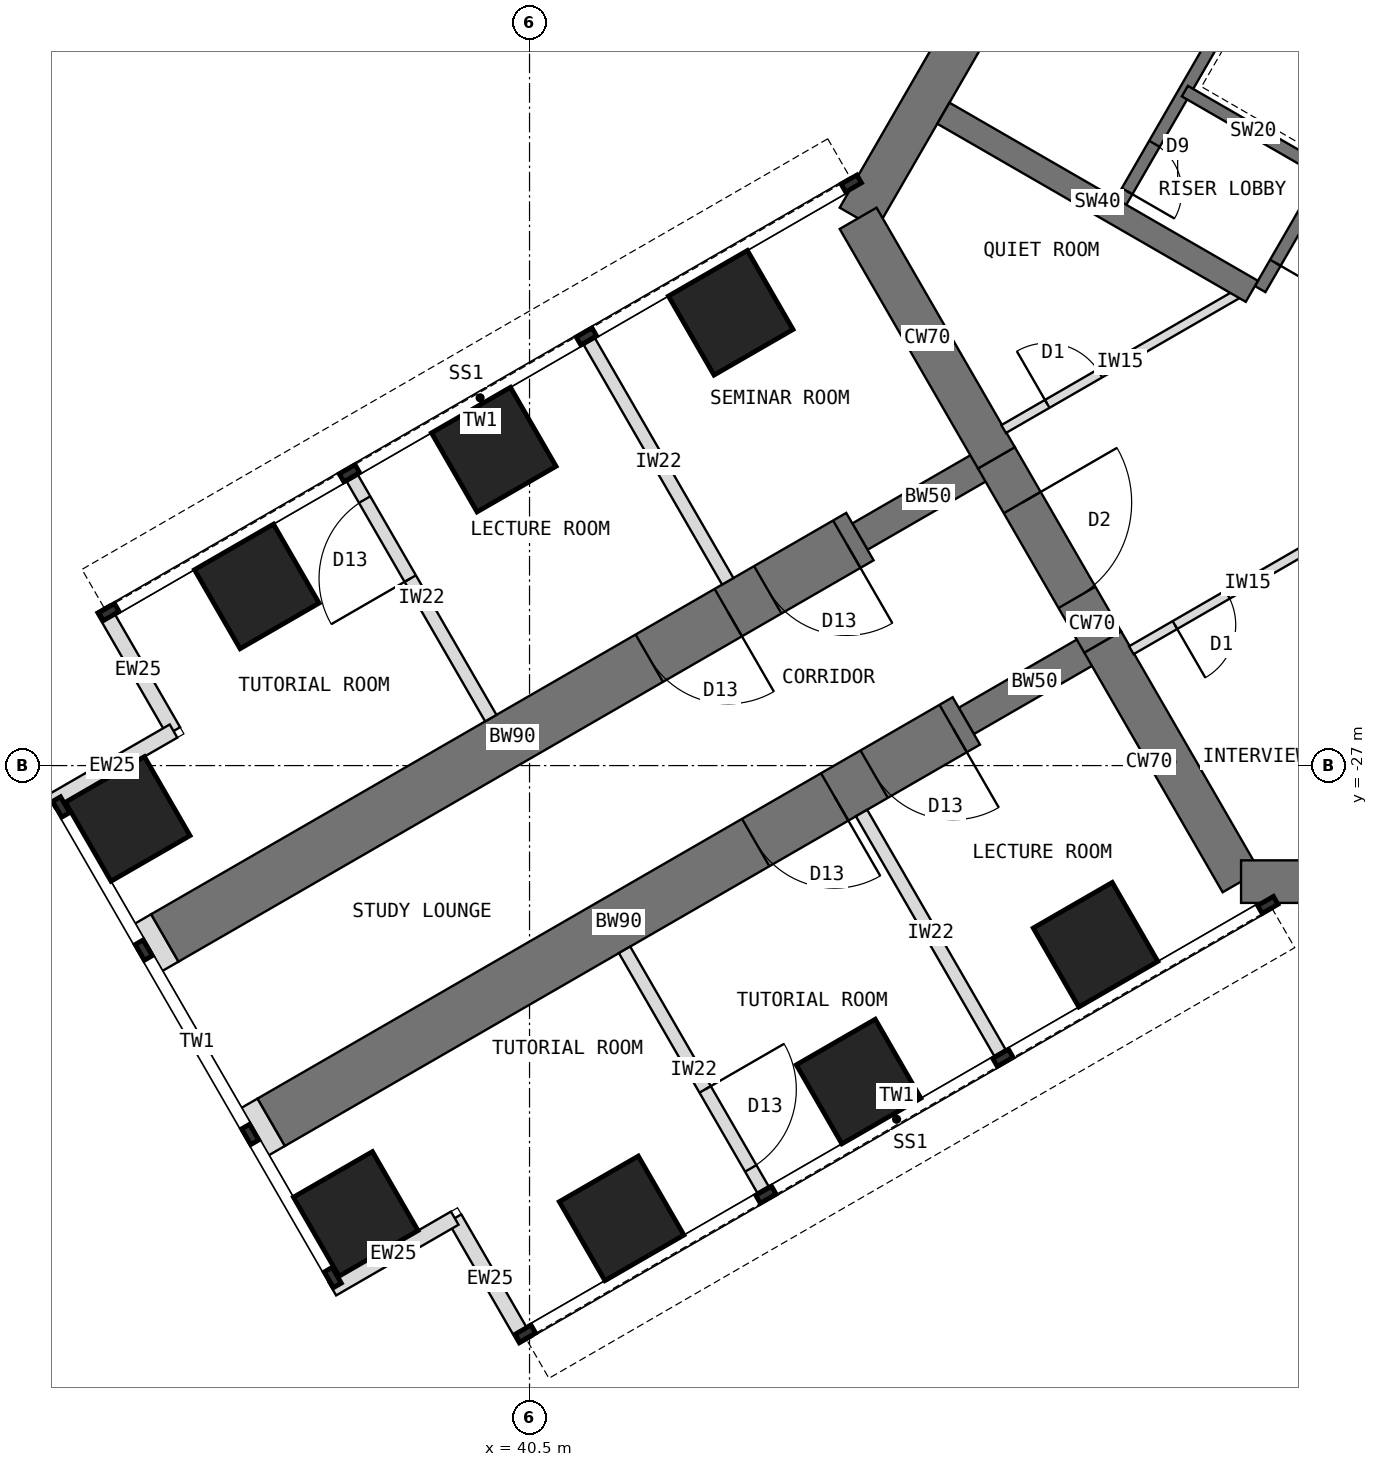
"""IFC4 building model, lengths in metres.
Left out: names, types, materials, properties, quantities, classifications, styles, units other than length and angle.
Written with IfcOpenShell. Run it as: python <this file> out.ifc"""

import sys

from ifc_helpers import new_model, si_unit, direction, frame, frame_2d, origin, origin_2d, place, context, subcontext, project, spatial, rectangle, extrude, element, fill, save


model = new_model("IFC4")
c1 = context("Model", 3, precision=1e-05, world=origin(), true_north=direction((0.0, 1.0)))
c2 = subcontext(c1, "Body", "Model", "MODEL_VIEW")
j1 = project(units=[si_unit("LENGTHUNIT", "METRE"), si_unit("PLANEANGLEUNIT", "RADIAN")], contexts=[c1])
p1 = place(None, origin())
s1 = spatial("IfcSite", under=j1, at=p1, CompositionType="ELEMENT")
p2 = place(p1, origin())
s2 = spatial("IfcBuilding", under=s1, at=p2, CompositionType="ELEMENT")
p3 = place(p2, frame((0.0, 0.0, 36.5)))
s3 = spatial("IfcBuildingStorey", under=s2, at=p3, CompositionType="ELEMENT", Elevation=36.5)
p4 = place(p3, frame((52.202, -7.092, 0.0), z_axis=(0.0, 0.0, 1.0), x_axis=(-0.500005998175, -0.866021940709, 0.0)))
e1 = element("IfcWall", 1, at=p4, inside=s3, PredefinedType="SHEAR", context=c2, shape_type="SweptSolid", body=[
    extrude(rectangle(XDim=12.596, YDim=0.7, at=frame_2d((6.298, 0.0))), origin(), (0.0, 0.0, 1.0), 4.0),
])
p5 = place(p3, frame((45.904, -18.0, 0.0), z_axis=(0.0, 0.0, 1.0), x_axis=(0.500024481964, -0.866011268655, 0.0)))
e2 = element("IfcWall", 2, at=p5, inside=s3, PredefinedType="SHEAR", context=c2, shape_type="SweptSolid", body=[
    extrude(rectangle(XDim=4.548, YDim=0.7, at=frame_2d((2.274, 0.0))), origin(), (0.0, 0.0, 1.0), 4.0),
])
p6 = place(p3, frame((48.178, -21.939, 0.0), z_axis=(0.0, 0.0, 1.0), x_axis=(0.500010275428, -0.866019471182, 0.0)))
e3 = element("IfcWall", 3, at=p6, inside=s3, PredefinedType="SHEAR", context=c2, shape_type="SweptSolid", body=[
    extrude(rectangle(XDim=3.5, YDim=0.7, at=frame_2d((1.75, 0.0))), origin(), (0.0, 0.0, 1.0), 4.0),
])
p7 = place(p6, frame((0.85, 0.0, 0.0)))
e4 = element("IfcOpeningElement", 4, at=p7, cuts=e3, PredefinedType="OPENING", context=c2, shape_type="SweptSolid", body=[
    extrude(rectangle(XDim=1.8, YDim=2.1, at=frame_2d((0.9, 1.05))), frame((0.0, 0.36, 0.0), z_axis=(0.0, -1.0, 0.0), x_axis=(1.0, 0.0, 0.0)), (0.0, 0.0, 1.0), 0.72),
])
p8 = place(p3, frame((49.928, -24.97, 0.0), z_axis=(0.0, 0.0, 1.0), x_axis=(0.499984222037, -0.866034513004, 0.0)))
e5 = element("IfcWall", 5, at=p8, inside=s3, PredefinedType="SHEAR", context=c2, shape_type="SweptSolid", body=[
    extrude(rectangle(XDim=4.548, YDim=0.7, at=frame_2d((2.274, 0.0))), origin(), (0.0, 0.0, 1.0), 4.0),
])
p9 = place(p3, frame((52.202, -28.908, 0.0), z_axis=(0.0, 0.0, 1.0), x_axis=(1.0, 0.0, 0.0)))
e6 = element("IfcWall", 6, at=p9, inside=s3, PredefinedType="SHEAR", context=c2, shape_type="SweptSolid", body=[
    extrude(rectangle(XDim=12.596, YDim=0.7, at=frame_2d((6.298, 0.0))), origin(), (0.0, 0.0, 1.0), 4.0),
])
p10 = place(p3, frame((49.928, -24.97, 0.0), z_axis=(0.0, 0.0, 1.0), x_axis=(-0.866031863473, -0.499988811324, 0.0)))
e7 = element("IfcWall", 7, at=p10, inside=s3, PredefinedType="SHEAR", context=c2, shape_type="SweptSolid", body=[
    extrude(rectangle(XDim=2.592, YDim=0.5, at=frame_2d((1.296, 0.0))), origin(), (0.0, 0.0, 1.0), 4.0),
])
p11 = place(p3, frame((47.684, -26.266, 0.0), z_axis=(0.0, 0.0, 1.0), x_axis=(-0.866027579429, -0.499996231654, 0.0)))
e8 = element("IfcWall", 8, at=p11, inside=s3, PredefinedType="SHEAR", context=c2, shape_type="SweptSolid", body=[
    extrude(rectangle(XDim=13.2, YDim=0.9, at=frame_2d((6.6, 0.0))), origin(), (0.0, 0.0, 1.0), 4.0),
])
p12 = place(p11, frame((0.25, 0.0, 0.0)))
e9 = element("IfcOpeningElement", 9, at=p12, cuts=e8, PredefinedType="OPENING", context=c2, shape_type="SweptSolid", body=[
    extrude(rectangle(XDim=1.5, YDim=2.1, at=frame_2d((0.75, 1.05))), frame((0.0, 0.46, 0.0), z_axis=(0.0, -1.0, 0.0), x_axis=(1.0, 0.0, 0.0)), (0.0, 0.0, 1.0), 0.92),
])
p13 = place(p11, frame((2.5, 0.0, 0.0)))
e10 = element("IfcOpeningElement", 10, at=p13, cuts=e8, PredefinedType="OPENING", context=c2, shape_type="SweptSolid", body=[
    extrude(rectangle(XDim=1.5, YDim=2.1, at=frame_2d((0.75, 1.05))), frame((0.0, 0.46, 0.0), z_axis=(0.0, -1.0, 0.0), x_axis=(1.0, 0.0, 0.0)), (0.0, 0.0, 1.0), 0.92),
])
p14 = place(p3, frame((48.178, -21.939, 0.0), z_axis=(0.0, 0.0, 1.0), x_axis=(-0.866072649678, -0.499918158782, 0.0)))
e11 = element("IfcWall", 11, at=p14, inside=s3, PredefinedType="SHEAR", context=c2, shape_type="SweptSolid", body=[
    extrude(rectangle(XDim=2.592, YDim=0.5, at=frame_2d((1.296, 0.0))), origin(), (0.0, 0.0, 1.0), 4.0),
])
p15 = place(p3, frame((45.934, -23.234, 0.0), z_axis=(0.0, 0.0, 1.0), x_axis=(-0.866019570528, -0.500010103361, 0.0)))
e12 = element("IfcWall", 12, at=p15, inside=s3, PredefinedType="SHEAR", context=c2, shape_type="SweptSolid", body=[
    extrude(rectangle(XDim=13.2, YDim=0.9, at=frame_2d((6.6, 0.0))), origin(), (0.0, 0.0, 1.0), 4.0),
])
p16 = place(p15, frame((0.25, 0.0, 0.0)))
e13 = element("IfcOpeningElement", 13, at=p16, cuts=e12, PredefinedType="OPENING", context=c2, shape_type="SweptSolid", body=[
    extrude(rectangle(XDim=1.5, YDim=2.1, at=frame_2d((0.75, 1.05))), frame((0.0, 0.46, 0.0), z_axis=(0.0, -1.0, 0.0), x_axis=(1.0, 0.0, 0.0)), (0.0, 0.0, 1.0), 0.92),
])
p17 = place(p15, frame((2.5, 0.0, 0.0)))
e14 = element("IfcOpeningElement", 14, at=p17, cuts=e12, PredefinedType="OPENING", context=c2, shape_type="SweptSolid", body=[
    extrude(rectangle(XDim=1.5, YDim=2.1, at=frame_2d((0.75, 1.05))), frame((0.0, 0.46, 0.0), z_axis=(0.0, -1.0, 0.0), x_axis=(1.0, 0.0, 0.0)), (0.0, 0.0, 1.0), 0.92),
])
for number, where, z_axis, x_axis in (
    (15, (49.809, -29.946, 0.0), (0.0, 0.0, 1.0), (0.866, 0.5, 0.0)),
    (16, (43.809, -19.554, 0.0), (0.0, 0.0, 1.0), (0.866, 0.5, 0.0)),
    (17, (45.912, -32.196, 0.0), (0.0, 0.0, 1.0), (0.866, 0.5, 0.0)),
    (18, (39.912, -21.804, 0.0), (0.0, 0.0, 1.0), (0.866, 0.5, 0.0)),
    (19, (42.014, -34.446, 0.0), (0.0, 0.0, 1.0), (0.866, 0.5, 0.0)),
    (20, (36.014, -24.054, 0.0), (0.0, 0.0, 1.0), (0.866, 0.5, 0.0)),
    (21, (37.642, -34.373, 0.0), (0.0, 0.0, 1.0), (0.866, 0.5, 0.0)),
    (22, (33.892, -27.877, 0.0), (0.0, 0.0, 1.0), (0.866, 0.5, 0.0)),
):
    element("IfcColumn", number, at=place(p3, frame(where, z_axis=z_axis, x_axis=x_axis)), inside=s3, PredefinedType="COLUMN", context=c2, shape_type="SweptSolid", body=[
        extrude(rectangle(XDim=1.5, YDim=1.5, at=origin_2d()), origin(), (0.0, 0.0, 1.0), 4.0),
    ])
for number, where, z_axis, x_axis in (
    (23, (40.433, -36.456, 0.0), (0.0, 0.0, 1.0), (-0.5, 0.866, 0.0)),
    (24, (39.27, -34.443, 0.0), (0.0, 0.0, 1.0), (-0.866, -0.5, 0.0)),
    (25, (33.483, -24.419, 0.0), (0.0, 0.0, 1.0), (0.5, -0.866, 0.0)),
    (26, (34.645, -26.432, 0.0), (0.0, 0.0, 1.0), (-0.866, -0.5, 0.0)),
):
    element("IfcWall", number, at=place(p3, frame(where, z_axis=z_axis, x_axis=x_axis)), inside=s3, PredefinedType="STANDARD", context=c2, shape_type="SweptSolid", body=[
        extrude(rectangle(XDim=2.325, YDim=0.25, at=frame_2d((1.163, 0.0))), origin(), (0.0, 0.0, 1.0), 3.8),
    ])
for number, where, z_axis, x_axis in (
    (27, (36.252, -32.865, 0.0), (0.0, 0.0, 1.0), (-0.866, -0.5, 0.0)),
    (28, (34.502, -29.834, 0.0), (0.0, 0.0, 1.0), (-0.866, -0.5, 0.0)),
):
    element("IfcWall", number, at=place(p3, frame(where, z_axis=z_axis, x_axis=x_axis)), inside=s3, PredefinedType="PARTITIONING", context=c2, shape_type="SweptSolid", body=[
        extrude(rectangle(XDim=0.31, YDim=0.9, at=frame_2d((0.155, 0.0))), origin(), (0.0, 0.0, 1.0), 3.8),
    ])
p18 = place(p3, frame((56.516, -12.236, 0.0), z_axis=(0.0, 0.0, 1.0), x_axis=(-0.49999894854, -0.866026010844, 0.0)))
e29 = element("IfcWall", 29, at=p18, inside=s3, PredefinedType="SHEAR", context=c2, shape_type="SweptSolid", body=[
    extrude(rectangle(XDim=8.0, YDim=0.2, at=frame_2d((4.0, 0.0))), origin(), (0.0, 0.0, 1.0), 4.0),
])
p19 = place(p18, frame((6.3, 0.0, 0.0)))
e30 = element("IfcOpeningElement", 30, at=p19, cuts=e29, PredefinedType="OPENING", context=c2, shape_type="SweptSolid", body=[
    extrude(rectangle(XDim=1.2, YDim=2.1, at=frame_2d((0.6, 1.05))), frame((0.0, 0.11, 0.0), z_axis=(0.0, -1.0, 0.0), x_axis=(1.0, 0.0, 0.0)), (0.0, 0.0, 1.0), 0.22),
])
p20 = place(p3, frame((53.53, -17.209, 0.0), z_axis=(0.0, 0.0, 1.0), x_axis=(-0.866062058628, 0.499936506574, 0.0)))
e31 = element("IfcWall", 31, at=p20, inside=s3, PredefinedType="SHEAR", context=c2, shape_type="SweptSolid", body=[
    extrude(rectangle(XDim=2.6, YDim=0.2, at=frame_2d((1.3, 0.0))), origin(), (0.0, 0.0, 1.0), 4.0),
])
p21 = place(p3, frame((54.178, -10.886, 0.0), z_axis=(0.0, 0.0, 1.0), x_axis=(-0.49999894854, -0.866026010844, 0.0)))
e32 = element("IfcWall", 32, at=p21, inside=s3, PredefinedType="SHEAR", context=c2, shape_type="SweptSolid", body=[
    extrude(rectangle(XDim=8.0, YDim=0.2, at=frame_2d((4.0, 0.0))), origin(), (0.0, 0.0, 1.0), 4.0),
])
p22 = place(p21, frame((6.8, 0.0, 0.0)))
e33 = element("IfcOpeningElement", 33, at=p22, cuts=e32, PredefinedType="OPENING", context=c2, shape_type="SweptSolid", body=[
    extrude(rectangle(XDim=0.9, YDim=2.1, at=frame_2d((0.45, 1.05))), frame((0.0, 0.11, 0.0), z_axis=(0.0, -1.0, 0.0), x_axis=(1.0, 0.0, 0.0)), (0.0, 0.0, 1.0), 0.22),
])
p23 = place(p3, frame((52.38, -19.201, 0.0), z_axis=(0.0, 0.0, 1.0), x_axis=(-0.866023886965, 0.500002627198, 0.0)))
e34 = element("IfcWall", 34, at=p23, inside=s3, PredefinedType="SHEAR", context=c2, shape_type="SweptSolid", body=[
    extrude(rectangle(XDim=5.858, YDim=0.4, at=frame_2d((2.929, 0.0))), origin(), (0.0, 0.0, 1.0), 4.0),
])
p24 = place(p3, frame((45.96, -27.78, 0.0), z_axis=(0.0, 0.0, 1.0), x_axis=(0.499982560684, -0.866035472144, 0.0)))
e35 = element("IfcWall", 35, at=p24, inside=s3, PredefinedType="PARTITIONING", context=c2, shape_type="SweptSolid", body=[
    extrude(rectangle(XDim=4.55, YDim=0.215, at=frame_2d((2.275, 0.0))), origin(), (0.0, 0.0, 1.0), 3.8),
])
p25 = place(p3, frame((42.063, -30.03, 0.0), z_axis=(0.0, 0.0, 1.0), x_axis=(0.499982560684, -0.866035472144, 0.0)))
e36 = element("IfcWall", 36, at=p25, inside=s3, PredefinedType="PARTITIONING", context=c2, shape_type="SweptSolid", body=[
    extrude(rectangle(XDim=4.55, YDim=0.215, at=frame_2d((2.275, 0.0))), origin(), (0.0, 0.0, 1.0), 3.8),
])
p26 = place(p25, frame((2.65, 0.0, 0.0)))
e37 = element("IfcOpeningElement", 37, at=p26, cuts=e36, PredefinedType="OPENING", context=c2, shape_type="SweptSolid", body=[
    extrude(rectangle(XDim=1.5, YDim=2.1, at=frame_2d((0.75, 1.05))), frame((0.0, 0.117, 0.0), z_axis=(0.0, -1.0, 0.0), x_axis=(1.0, 0.0, 0.0)), (0.0, 0.0, 1.0), 0.235),
])
p27 = place(p3, frame((43.76, -23.97, 0.0), z_axis=(0.0, 0.0, 1.0), x_axis=(-0.499982560684, 0.866035472144, 0.0)))
e38 = element("IfcWall", 38, at=p27, inside=s3, PredefinedType="PARTITIONING", context=c2, shape_type="SweptSolid", body=[
    extrude(rectangle(XDim=4.55, YDim=0.215, at=frame_2d((2.275, 0.0))), origin(), (0.0, 0.0, 1.0), 3.8),
])
p28 = place(p3, frame((39.863, -26.22, 0.0), z_axis=(0.0, 0.0, 1.0), x_axis=(-0.500022803284, 0.866012237902, 0.0)))
e39 = element("IfcWall", 39, at=p28, inside=s3, PredefinedType="PARTITIONING", context=c2, shape_type="SweptSolid", body=[
    extrude(rectangle(XDim=4.55, YDim=0.215, at=frame_2d((2.275, 0.0))), origin(), (0.0, 0.0, 1.0), 3.8),
])
p29 = place(p28, frame((2.65, 0.0, 0.0)))
e40 = element("IfcOpeningElement", 40, at=p29, cuts=e39, PredefinedType="OPENING", context=c2, shape_type="SweptSolid", body=[
    extrude(rectangle(XDim=1.5, YDim=2.1, at=frame_2d((0.75, 1.05))), frame((0.0, 0.117, 0.0), z_axis=(0.0, -1.0, 0.0), x_axis=(1.0, 0.0, 0.0)), (0.0, 0.0, 1.0), 0.235),
])
p30 = place(p3, frame((48.298, -21.466, 0.0), z_axis=(0.0, 0.0, 1.0), x_axis=(0.866021148949, 0.500007369519, 0.0)))
e41 = element("IfcWall", 41, at=p30, inside=s3, PredefinedType="PARTITIONING", context=c2, shape_type="SweptSolid", body=[
    extrude(rectangle(XDim=4.426, YDim=0.15, at=frame_2d((2.213, 0.0))), origin(), (0.0, 0.0, 1.0), 3.8),
])
p31 = place(p30, frame((0.828, 0.0, 0.0)))
e42 = element("IfcOpeningElement", 42, at=p31, cuts=e41, PredefinedType="OPENING", context=c2, shape_type="SweptSolid", body=[
    extrude(rectangle(XDim=1.0, YDim=2.1, at=frame_2d((0.5, 1.05))), frame((0.0, 0.085, 0.0), z_axis=(0.0, -1.0, 0.0), x_axis=(1.0, 0.0, 0.0)), (0.0, 0.0, 1.0), 0.17),
])
p32 = place(p3, frame((54.23, -22.89, 0.0), z_axis=(0.0, 0.0, 1.0), x_axis=(-0.866021148949, -0.500007369519, 0.0)))
e43 = element("IfcWall", 43, at=p32, inside=s3, PredefinedType="PARTITIONING", context=c2, shape_type="SweptSolid", body=[
    extrude(rectangle(XDim=4.426, YDim=0.15, at=frame_2d((2.213, 0.0))), origin(), (0.0, 0.0, 1.0), 3.8),
])
p33 = place(p32, frame((2.598, 0.0, 0.0)))
e44 = element("IfcOpeningElement", 44, at=p33, cuts=e43, PredefinedType="OPENING", context=c2, shape_type="SweptSolid", body=[
    extrude(rectangle(XDim=1.0, YDim=2.1, at=frame_2d((0.5, 1.05))), frame((0.0, 0.085, 0.0), z_axis=(0.0, -1.0, 0.0), x_axis=(1.0, 0.0, 0.0)), (0.0, 0.0, 1.0), 0.17),
])
p34 = place(p19, origin())
e45 = element("IfcDoor", 45, at=p34, inside=s3, OperationType="SINGLE_SWING_RIGHT", PredefinedType="DOOR", context=c2, shape_type="SweptSolid", body=[
    extrude(rectangle(XDim=1.2, YDim=2.1, at=frame_2d((0.6, 1.05))), frame((0.0, 0.025, 0.0), z_axis=(0.0, -1.0, 0.0), x_axis=(1.0, 0.0, 0.0)), (0.0, 0.0, 1.0), 0.05),
])
fill(e30, e45)
p35 = place(p22, origin())
e46 = element("IfcDoor", 46, at=p35, inside=s3, OperationType="SINGLE_SWING_RIGHT", PredefinedType="DOOR", context=c2, shape_type="SweptSolid", body=[
    extrude(rectangle(XDim=0.9, YDim=2.1, at=frame_2d((0.45, 1.05))), frame((0.0, 0.025, 0.0), z_axis=(0.0, -1.0, 0.0), x_axis=(1.0, 0.0, 0.0)), (0.0, 0.0, 1.0), 0.05),
])
fill(e33, e46)
p36 = place(p7, origin())
e47 = element("IfcDoor", 47, at=p36, inside=s3, OperationType="DOUBLE_DOOR_DOUBLE_SWING", PredefinedType="DOOR", context=c2, shape_type="SweptSolid", body=[
    extrude(rectangle(XDim=1.72, YDim=2.06, at=frame_2d((0.9, 1.03))), frame((0.0, 0.025, 0.0), z_axis=(0.0, -1.0, 0.0), x_axis=(1.0, 0.0, 0.0)), (0.0, 0.0, 1.0), 0.05),
    extrude(rectangle(XDim=0.04, YDim=2.1, at=frame_2d((0.02, 1.05))), frame((0.0, 0.35, 0.0), z_axis=(0.0, -1.0, 0.0), x_axis=(1.0, 0.0, 0.0)), (0.0, 0.0, 1.0), 0.699),
    extrude(rectangle(XDim=0.04, YDim=2.1, at=frame_2d((1.78, 1.05))), frame((0.0, 0.35, 0.0), z_axis=(0.0, -1.0, 0.0), x_axis=(1.0, 0.0, 0.0)), (0.0, 0.0, 1.0), 0.699),
    extrude(rectangle(XDim=1.72, YDim=0.04, at=frame_2d((0.9, 2.08))), frame((0.0, 0.35, 0.0), z_axis=(0.0, -1.0, 0.0), x_axis=(1.0, 0.0, 0.0)), (0.0, 0.0, 1.0), 0.699),
])
fill(e4, e47)
p37 = place(p26, origin())
e48 = element("IfcDoor", 48, at=p37, inside=s3, OperationType="DOUBLE_DOOR_SINGLE_SWING", PredefinedType="DOOR", context=c2, shape_type="SweptSolid", body=[
    extrude(rectangle(XDim=1.5, YDim=2.1, at=frame_2d((0.75, 1.05))), frame((0.0, 0.025, 0.0), z_axis=(0.0, -1.0, 0.0), x_axis=(1.0, 0.0, 0.0)), (0.0, 0.0, 1.0), 0.05),
])
fill(e37, e48)
p38 = place(p29, origin())
e49 = element("IfcDoor", 49, at=p38, inside=s3, OperationType="DOUBLE_DOOR_SINGLE_SWING", PredefinedType="DOOR", context=c2, shape_type="SweptSolid", body=[
    extrude(rectangle(XDim=1.5, YDim=2.1, at=frame_2d((0.75, 1.05))), frame((0.0, 0.025, 0.0), z_axis=(0.0, -1.0, 0.0), x_axis=(1.0, 0.0, 0.0)), (0.0, 0.0, 1.0), 0.05),
])
fill(e40, e49)
p39 = place(p31, origin())
e50 = element("IfcDoor", 50, at=p39, inside=s3, OperationType="SINGLE_SWING_LEFT", PredefinedType="DOOR", context=c2, shape_type="SweptSolid", body=[
    extrude(rectangle(XDim=1.0, YDim=2.1, at=frame_2d((0.5, 1.05))), frame((0.0, 0.025, 0.0), z_axis=(0.0, -1.0, 0.0), x_axis=(1.0, 0.0, 0.0)), (0.0, 0.0, 1.0), 0.05),
])
fill(e42, e50)
p40 = place(p33, origin())
e51 = element("IfcDoor", 51, at=p40, inside=s3, OperationType="SINGLE_SWING_RIGHT", PredefinedType="DOOR", context=c2, shape_type="SweptSolid", body=[
    extrude(rectangle(XDim=1.0, YDim=2.1, at=frame_2d((0.5, 1.05))), frame((0.0, 0.025, 0.0), z_axis=(0.0, -1.0, 0.0), x_axis=(1.0, 0.0, 0.0)), (0.0, 0.0, 1.0), 0.05),
])
fill(e44, e51)
p41 = place(p12, origin())
e52 = element("IfcDoor", 52, at=p41, inside=s3, OperationType="DOUBLE_DOOR_SINGLE_SWING", PredefinedType="DOOR", context=c2, shape_type="SweptSolid", body=[
    extrude(rectangle(XDim=1.42, YDim=2.06, at=frame_2d((0.75, 1.03))), frame((0.0, 0.025, 0.0), z_axis=(0.0, -1.0, 0.0), x_axis=(1.0, 0.0, 0.0)), (0.0, 0.0, 1.0), 0.05),
    extrude(rectangle(XDim=0.04, YDim=2.1, at=frame_2d((0.02, 1.05))), frame((0.0, 0.45, 0.0), z_axis=(0.0, -1.0, 0.0), x_axis=(1.0, 0.0, 0.0)), (0.0, 0.0, 1.0), 0.899),
    extrude(rectangle(XDim=0.04, YDim=2.1, at=frame_2d((1.48, 1.05))), frame((0.0, 0.45, 0.0), z_axis=(0.0, -1.0, 0.0), x_axis=(1.0, 0.0, 0.0)), (0.0, 0.0, 1.0), 0.899),
    extrude(rectangle(XDim=1.42, YDim=0.04, at=frame_2d((0.75, 2.08))), frame((0.0, 0.45, 0.0), z_axis=(0.0, -1.0, 0.0), x_axis=(1.0, 0.0, 0.0)), (0.0, 0.0, 1.0), 0.899),
])
fill(e9, e52)
p42 = place(p13, origin())
e53 = element("IfcDoor", 53, at=p42, inside=s3, OperationType="DOUBLE_DOOR_SINGLE_SWING", PredefinedType="DOOR", context=c2, shape_type="SweptSolid", body=[
    extrude(rectangle(XDim=1.42, YDim=2.06, at=frame_2d((0.75, 1.03))), frame((0.0, 0.025, 0.0), z_axis=(0.0, -1.0, 0.0), x_axis=(1.0, 0.0, 0.0)), (0.0, 0.0, 1.0), 0.05),
    extrude(rectangle(XDim=0.04, YDim=2.1, at=frame_2d((0.02, 1.05))), frame((0.0, 0.45, 0.0), z_axis=(0.0, -1.0, 0.0), x_axis=(1.0, 0.0, 0.0)), (0.0, 0.0, 1.0), 0.899),
    extrude(rectangle(XDim=0.04, YDim=2.1, at=frame_2d((1.48, 1.05))), frame((0.0, 0.45, 0.0), z_axis=(0.0, -1.0, 0.0), x_axis=(1.0, 0.0, 0.0)), (0.0, 0.0, 1.0), 0.899),
    extrude(rectangle(XDim=1.42, YDim=0.04, at=frame_2d((0.75, 2.08))), frame((0.0, 0.45, 0.0), z_axis=(0.0, -1.0, 0.0), x_axis=(1.0, 0.0, 0.0)), (0.0, 0.0, 1.0), 0.899),
])
fill(e10, e53)
p43 = place(p16, origin())
e54 = element("IfcDoor", 54, at=p43, inside=s3, OperationType="DOUBLE_DOOR_SINGLE_SWING", PredefinedType="DOOR", context=c2, shape_type="SweptSolid", body=[
    extrude(rectangle(XDim=1.42, YDim=2.06, at=frame_2d((0.75, 1.03))), frame((0.0, 0.025, 0.0), z_axis=(0.0, -1.0, 0.0), x_axis=(1.0, 0.0, 0.0)), (0.0, 0.0, 1.0), 0.05),
    extrude(rectangle(XDim=0.04, YDim=2.1, at=frame_2d((0.02, 1.05))), frame((0.0, 0.45, 0.0), z_axis=(0.0, -1.0, 0.0), x_axis=(1.0, 0.0, 0.0)), (0.0, 0.0, 1.0), 0.899),
    extrude(rectangle(XDim=0.04, YDim=2.1, at=frame_2d((1.48, 1.05))), frame((0.0, 0.45, 0.0), z_axis=(0.0, -1.0, 0.0), x_axis=(1.0, 0.0, 0.0)), (0.0, 0.0, 1.0), 0.899),
    extrude(rectangle(XDim=1.42, YDim=0.04, at=frame_2d((0.75, 2.08))), frame((0.0, 0.45, 0.0), z_axis=(0.0, -1.0, 0.0), x_axis=(1.0, 0.0, 0.0)), (0.0, 0.0, 1.0), 0.899),
])
fill(e13, e54)
p44 = place(p17, origin())
e55 = element("IfcDoor", 55, at=p44, inside=s3, OperationType="DOUBLE_DOOR_SINGLE_SWING", PredefinedType="DOOR", context=c2, shape_type="SweptSolid", body=[
    extrude(rectangle(XDim=1.42, YDim=2.06, at=frame_2d((0.75, 1.03))), frame((0.0, 0.025, 0.0), z_axis=(0.0, -1.0, 0.0), x_axis=(1.0, 0.0, 0.0)), (0.0, 0.0, 1.0), 0.05),
    extrude(rectangle(XDim=0.04, YDim=2.1, at=frame_2d((0.02, 1.05))), frame((0.0, 0.45, 0.0), z_axis=(0.0, -1.0, 0.0), x_axis=(1.0, 0.0, 0.0)), (0.0, 0.0, 1.0), 0.899),
    extrude(rectangle(XDim=0.04, YDim=2.1, at=frame_2d((1.48, 1.05))), frame((0.0, 0.45, 0.0), z_axis=(0.0, -1.0, 0.0), x_axis=(1.0, 0.0, 0.0)), (0.0, 0.0, 1.0), 0.899),
    extrude(rectangle(XDim=1.42, YDim=0.04, at=frame_2d((0.75, 2.08))), frame((0.0, 0.45, 0.0), z_axis=(0.0, -1.0, 0.0), x_axis=(1.0, 0.0, 0.0)), (0.0, 0.0, 1.0), 0.899),
])
fill(e14, e55)
save(model, sys.argv[1])
